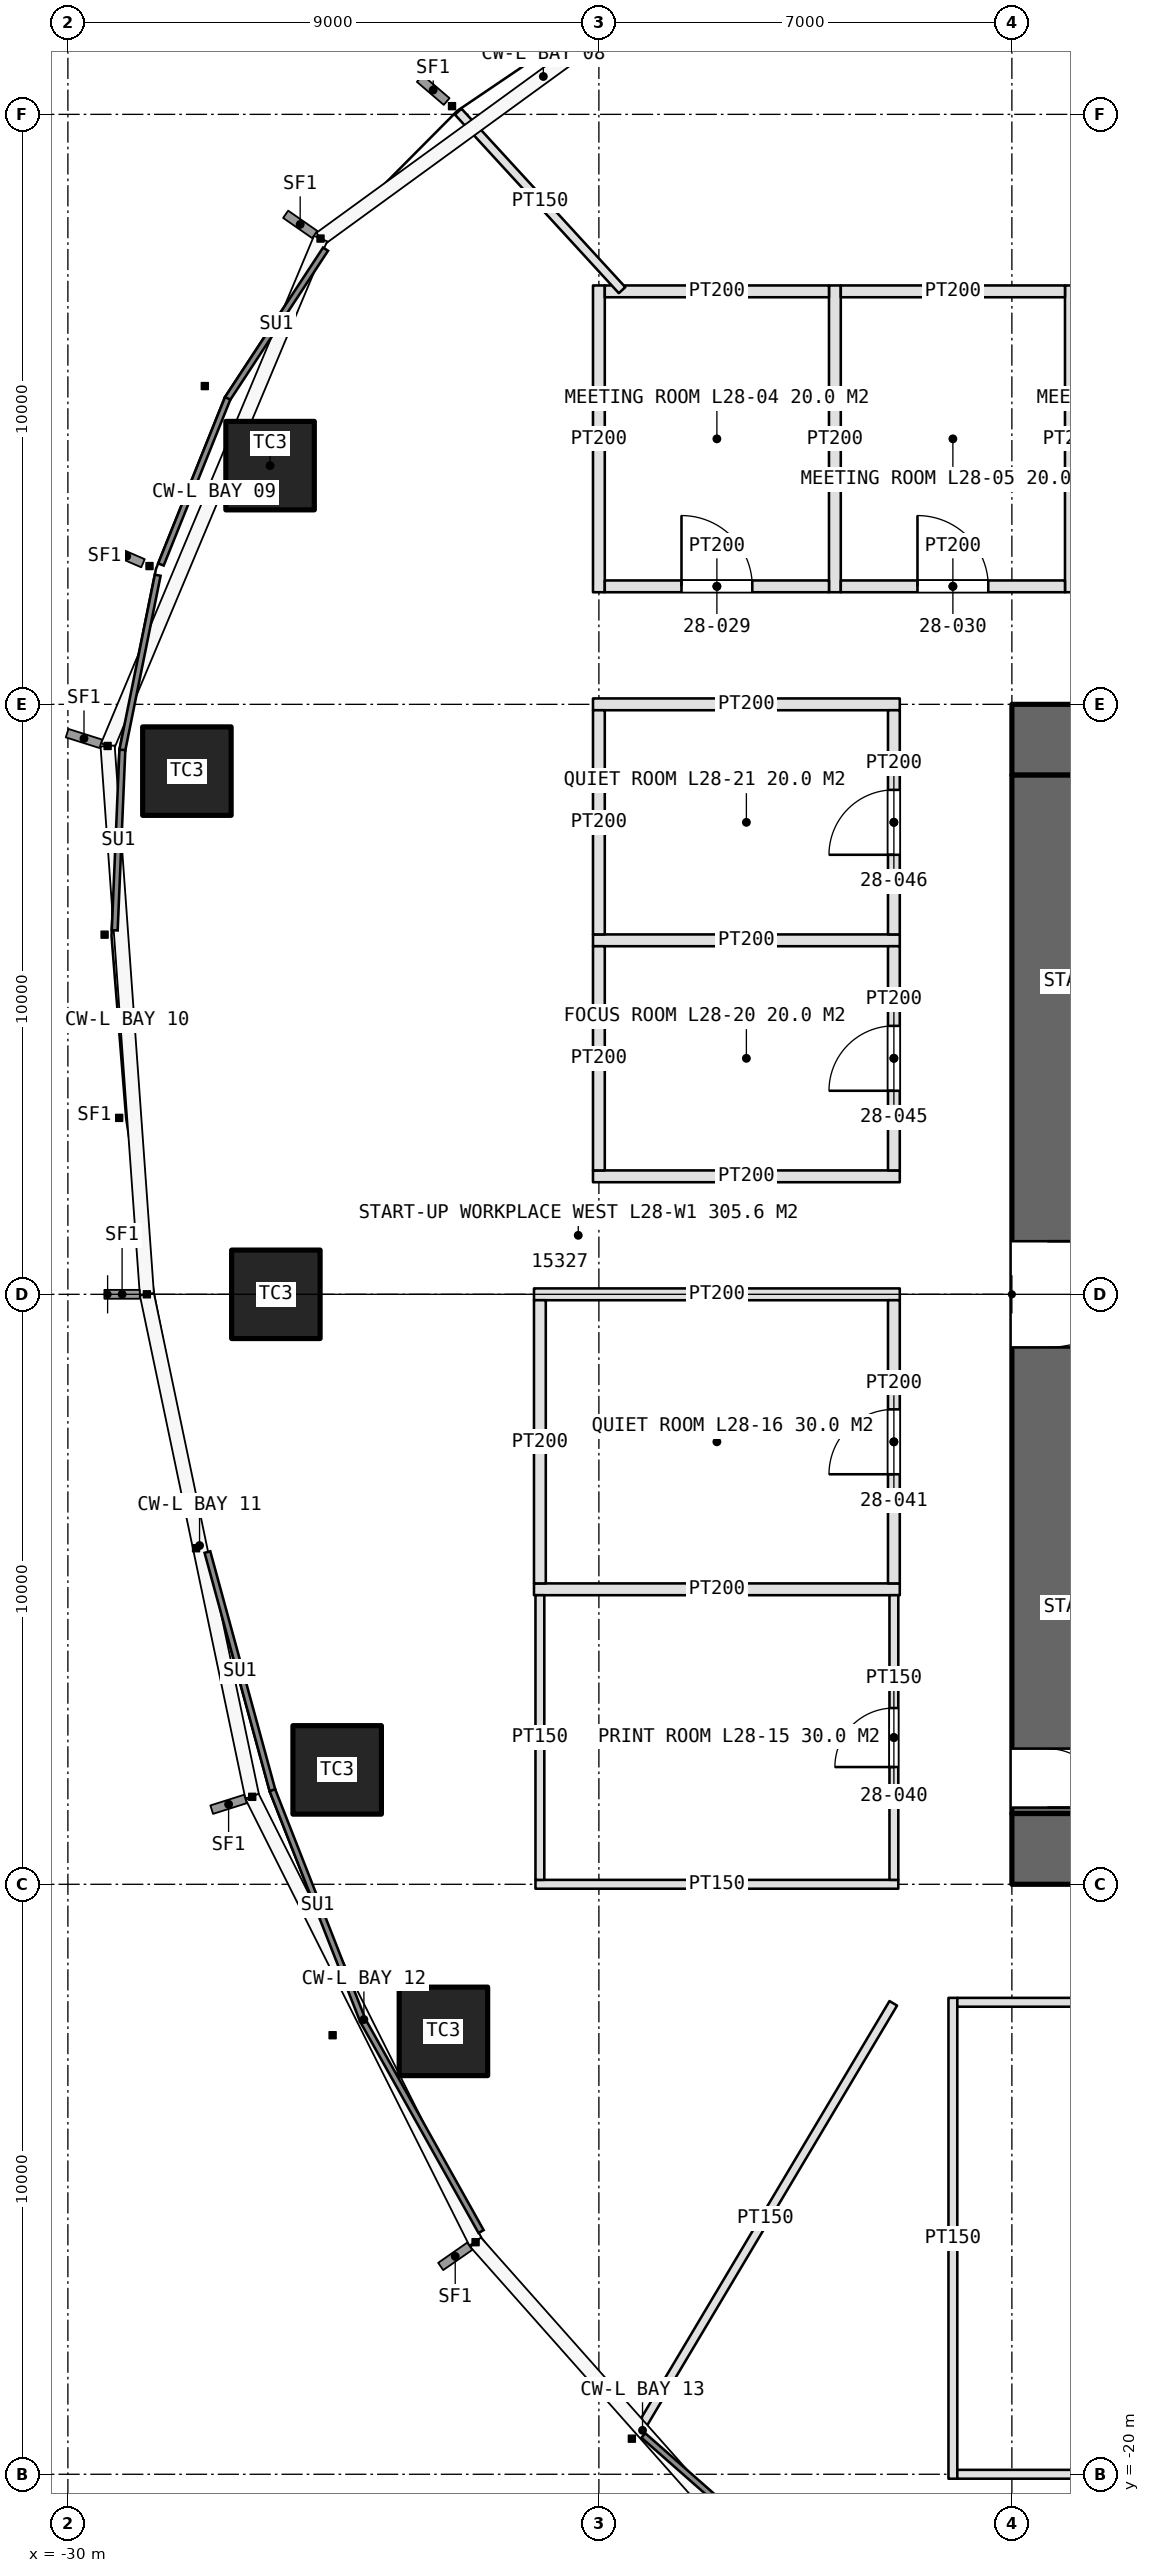
"""IFC4 building model, lengths in metres.
Left out: names, types, materials, properties, quantities, classifications, styles, units other than length and angle.
Written with IfcOpenShell. Run it as: python <this file> out.ifc"""

import sys

from ifc_helpers import new_model, si_unit, direction, frame, frame_2d, origin, origin_2d, place, context, subcontext, project, spatial, rectangle, extrude, element, fill, save


model = new_model("IFC4")
c1 = context("Model", 3, precision=1e-05, world=origin(), true_north=direction((0.0, 1.0)))
c2 = subcontext(c1, "Body", "Model", "MODEL_VIEW")
j1 = project(units=[si_unit("LENGTHUNIT", "METRE"), si_unit("PLANEANGLEUNIT", "RADIAN")], contexts=[c1])
p1 = place(None, origin())
s1 = spatial("IfcSite", under=j1, at=p1, CompositionType="ELEMENT")
p2 = place(p1, origin())
s2 = spatial("IfcBuilding", under=s1, at=p2, CompositionType="ELEMENT")
p3 = place(p2, frame((0.0, 0.0, 134.4)))
s3 = spatial("IfcBuildingStorey", under=s2, at=p3, CompositionType="ELEMENT", Elevation=134.4)
p4 = place(p3, frame((-14.0, -9.4, 0.0), z_axis=(0.0, 0.0, 1.0), x_axis=(1.0, 0.0, 0.0)))
e1 = element("IfcWall", 1, at=p4, inside=s3, PredefinedType="SHEAR", context=c2, shape_type="SweptSolid", body=[
    extrude(rectangle(XDim=28.0, YDim=1.2, at=frame_2d((14.0, 0.0))), origin(), (0.0, 0.0, 1.0), 4.2),
])
p5 = place(p4, frame((13.1, 0.0, 0.0)))
e2 = element("IfcOpeningElement", 2, at=p5, cuts=e1, PredefinedType="OPENING", context=c2, shape_type="SweptSolid", body=[
    extrude(rectangle(XDim=1.8, YDim=2.4, at=frame_2d((0.9, 1.2))), frame((0.0, 0.61, 0.0), z_axis=(0.0, -1.0, 0.0), x_axis=(1.0, 0.0, 0.0)), (0.0, 0.0, 1.0), 1.22),
])
p6 = place(p4, frame((22.9, 0.0, 0.0)))
e3 = element("IfcOpeningElement", 3, at=p6, cuts=e1, PredefinedType="OPENING", context=c2, shape_type="SweptSolid", body=[
    extrude(rectangle(XDim=2.2, YDim=2.7, at=frame_2d((1.1, 1.35))), frame((0.0, 0.61, 0.0), z_axis=(0.0, -1.0, 0.0), x_axis=(1.0, 0.0, 0.0)), (0.0, 0.0, 1.0), 1.22),
])
p7 = place(p3, frame((14.0, 9.4, 0.0), z_axis=(0.0, 0.0, 1.0), x_axis=(-1.0, 0.0, 0.0)))
e4 = element("IfcWall", 4, at=p7, inside=s3, PredefinedType="SHEAR", context=c2, shape_type="SweptSolid", body=[
    extrude(rectangle(XDim=28.0, YDim=1.2, at=frame_2d((14.0, 0.0))), origin(), (0.0, 0.0, 1.0), 4.2),
])
p8 = place(p7, frame((24.0, 0.0, 0.0)))
e5 = element("IfcOpeningElement", 5, at=p8, cuts=e4, PredefinedType="OPENING", context=c2, shape_type="SweptSolid", body=[
    extrude(rectangle(XDim=1.0, YDim=2.4, at=frame_2d((0.5, 1.2))), frame((0.0, 0.61, 0.0), z_axis=(0.0, -1.0, 0.0), x_axis=(1.0, 0.0, 0.0)), (0.0, 0.0, 1.0), 1.22),
])
p9 = place(p7, frame((13.1, 0.0, 0.0)))
e6 = element("IfcOpeningElement", 6, at=p9, cuts=e4, PredefinedType="OPENING", context=c2, shape_type="SweptSolid", body=[
    extrude(rectangle(XDim=1.8, YDim=2.4, at=frame_2d((0.9, 1.2))), frame((0.0, 0.61, 0.0), z_axis=(0.0, -1.0, 0.0), x_axis=(1.0, 0.0, 0.0)), (0.0, 0.0, 1.0), 1.22),
])
p10 = place(p3, frame((-13.4, 8.8, 0.0), z_axis=(0.0, 0.0, 1.0), x_axis=(0.0, -1.0, 0.0)))
e7 = element("IfcWall", 7, at=p10, inside=s3, PredefinedType="SHEAR", context=c2, shape_type="SweptSolid", body=[
    extrude(rectangle(XDim=17.6, YDim=1.2, at=frame_2d((8.8, 0.0))), origin(), (0.0, 0.0, 1.0), 4.2),
])
p11 = place(p10, frame((7.9, 0.0, 0.0)))
e8 = element("IfcOpeningElement", 8, at=p11, cuts=e7, PredefinedType="OPENING", context=c2, shape_type="SweptSolid", body=[
    extrude(rectangle(XDim=1.8, YDim=2.4, at=frame_2d((0.9, 1.2))), frame((0.0, 0.61, 0.0), z_axis=(0.0, -1.0, 0.0), x_axis=(1.0, 0.0, 0.0)), (0.0, 0.0, 1.0), 1.22),
])
p12 = place(p10, frame((16.5, 0.0, 0.0)))
e9 = element("IfcOpeningElement", 9, at=p12, cuts=e7, PredefinedType="OPENING", context=c2, shape_type="SweptSolid", body=[
    extrude(rectangle(XDim=1.0, YDim=2.4, at=frame_2d((0.5, 1.2))), frame((0.0, 0.61, 0.0), z_axis=(0.0, -1.0, 0.0), x_axis=(1.0, 0.0, 0.0)), (0.0, 0.0, 1.0), 1.22),
])
for number, where, z_axis, x_axis in (
    (10, (-26.573, 14.046, 0.0), (0.0, 0.0, 1.0), (1.0, 0.0, 0.0)),
    (11, (-27.983, 8.868, 0.0), (0.0, 0.0, 1.0), (1.0, 0.0, 0.0)),
    (12, (-26.475, 0.0, 0.0), (0.0, 0.0, 1.0), (1.0, 0.0, 0.0)),
    (13, (-25.436, -8.061, 0.0), (0.0, 0.0, 1.0), (1.0, 0.0, 0.0)),
    (14, (-23.635, -12.493, 0.0), (0.0, 0.0, 1.0), (1.0, 0.0, 0.0)),
):
    element("IfcColumn", number, at=place(p3, frame(where, z_axis=z_axis, x_axis=x_axis)), inside=s3, PredefinedType="COLUMN", context=c2, shape_type="SweptSolid", body=[
        extrude(rectangle(XDim=1.5, YDim=1.5, at=origin_2d()), origin(), (0.0, 0.0, 1.0), 4.2),
    ])
p13 = place(p3, frame((-15.0, -11.925, 0.0), z_axis=(0.0, 0.0, 1.0), x_axis=(0.0, -1.0, 0.0)))
e15 = element("IfcWall", 15, at=p13, inside=s3, PredefinedType="PARTITIONING", context=c2, shape_type="SweptSolid", body=[
    extrude(rectangle(XDim=8.15, YDim=0.15, at=frame_2d((4.075, 0.0))), origin(), (0.0, 0.0, 1.0), 3.0),
])
p14 = place(p3, frame((-14.925, -12.0, 0.0), z_axis=(0.0, 0.0, 1.0), x_axis=(1.0, 0.0, 0.0)))
e16 = element("IfcWall", 16, at=p14, inside=s3, PredefinedType="PARTITIONING", context=c2, shape_type="SweptSolid", body=[
    extrude(rectangle(XDim=11.85, YDim=0.15, at=frame_2d((5.925, 0.0))), origin(), (0.0, 0.0, 1.0), 3.0),
])
p15 = place(p14, frame((5.325, 0.0, 0.0)))
e17 = element("IfcOpeningElement", 17, at=p15, cuts=e16, PredefinedType="OPENING", context=c2, shape_type="SweptSolid", body=[
    extrude(rectangle(XDim=1.2, YDim=2.4, at=frame_2d((0.6, 1.2))), frame((0.0, 0.085, 0.0), z_axis=(0.0, -1.0, 0.0), x_axis=(1.0, 0.0, 0.0)), (0.0, 0.0, 1.0), 0.17),
])
p16 = place(p3, frame((-14.925, -20.0, 0.0), z_axis=(0.0, 0.0, 1.0), x_axis=(1.0, 0.0, 0.0)))
e18 = element("IfcWall", 18, at=p16, inside=s3, PredefinedType="PARTITIONING", context=c2, shape_type="SweptSolid", body=[
    extrude(rectangle(XDim=11.85, YDim=0.15, at=frame_2d((5.925, 0.0))), origin(), (0.0, 0.0, 1.0), 3.0),
])
for number, where, z_axis, x_axis in (
    (19, (-21.0, 11.9, 0.0), (0.0, 0.0, 1.0), (0.0, 1.0, 0.0)),
    (20, (-17.0, 11.9, 0.0), (0.0, 0.0, 1.0), (0.0, 1.0, 0.0)),
    (21, (-13.0, 11.9, 0.0), (0.0, 0.0, 1.0), (0.0, 1.0, 0.0)),
):
    element("IfcWall", number, at=place(p3, frame(where, z_axis=z_axis, x_axis=x_axis)), inside=s3, PredefinedType="PARTITIONING", context=c2, shape_type="SweptSolid", body=[
        extrude(rectangle(XDim=5.2, YDim=0.2, at=frame_2d((2.6, 0.0))), origin(), (0.0, 0.0, 1.0), 3.0),
    ])
p17 = place(p3, frame((-20.9, 12.0, 0.0), z_axis=(0.0, 0.0, 1.0), x_axis=(1.0, 0.0, 0.0)))
e22 = element("IfcWall", 22, at=p17, inside=s3, PredefinedType="PARTITIONING", context=c2, shape_type="SweptSolid", body=[
    extrude(rectangle(XDim=3.8, YDim=0.2, at=frame_2d((1.9, 0.0))), origin(), (0.0, 0.0, 1.0), 3.0),
])
p18 = place(p17, frame((1.3, 0.0, 0.0)))
e23 = element("IfcOpeningElement", 23, at=p18, cuts=e22, PredefinedType="OPENING", context=c2, shape_type="SweptSolid", body=[
    extrude(rectangle(XDim=1.2, YDim=2.4, at=frame_2d((0.6, 1.2))), frame((0.0, 0.11, 0.0), z_axis=(0.0, -1.0, 0.0), x_axis=(1.0, 0.0, 0.0)), (0.0, 0.0, 1.0), 0.22),
])
p19 = place(p3, frame((-20.9, 17.0, 0.0), z_axis=(0.0, 0.0, 1.0), x_axis=(1.0, 0.0, 0.0)))
e24 = element("IfcWall", 24, at=p19, inside=s3, PredefinedType="PARTITIONING", context=c2, shape_type="SweptSolid", body=[
    extrude(rectangle(XDim=3.8, YDim=0.2, at=frame_2d((1.9, 0.0))), origin(), (0.0, 0.0, 1.0), 3.0),
])
p20 = place(p3, frame((-16.9, 12.0, 0.0), z_axis=(0.0, 0.0, 1.0), x_axis=(1.0, 0.0, 0.0)))
e25 = element("IfcWall", 25, at=p20, inside=s3, PredefinedType="PARTITIONING", context=c2, shape_type="SweptSolid", body=[
    extrude(rectangle(XDim=3.8, YDim=0.2, at=frame_2d((1.9, 0.0))), origin(), (0.0, 0.0, 1.0), 3.0),
])
p21 = place(p20, frame((1.3, 0.0, 0.0)))
e26 = element("IfcOpeningElement", 26, at=p21, cuts=e25, PredefinedType="OPENING", context=c2, shape_type="SweptSolid", body=[
    extrude(rectangle(XDim=1.2, YDim=2.4, at=frame_2d((0.6, 1.2))), frame((0.0, 0.11, 0.0), z_axis=(0.0, -1.0, 0.0), x_axis=(1.0, 0.0, 0.0)), (0.0, 0.0, 1.0), 0.22),
])
p22 = place(p3, frame((-16.9, 17.0, 0.0), z_axis=(0.0, 0.0, 1.0), x_axis=(1.0, 0.0, 0.0)))
e27 = element("IfcWall", 27, at=p22, inside=s3, PredefinedType="PARTITIONING", context=c2, shape_type="SweptSolid", body=[
    extrude(rectangle(XDim=3.8, YDim=0.2, at=frame_2d((1.9, 0.0))), origin(), (0.0, 0.0, 1.0), 3.0),
])
p23 = place(p3, frame((-15.925, -10.0, 0.0), z_axis=(0.0, 0.0, 1.0), x_axis=(-1.0, 0.0, 0.0)))
e28 = element("IfcWall", 28, at=p23, inside=s3, PredefinedType="PARTITIONING", context=c2, shape_type="SweptSolid", body=[
    extrude(rectangle(XDim=6.15, YDim=0.15, at=frame_2d((3.075, 0.0))), origin(), (0.0, 0.0, 1.0), 3.0),
])
for number, where, z_axis, x_axis in (
    (29, (-15.9, -5.0, 0.0), (0.0, 0.0, 1.0), (-1.0, 0.0, 0.0)),
    (30, (-15.9, 0.0, 0.0), (0.0, 0.0, 1.0), (-1.0, 0.0, 0.0)),
):
    element("IfcWall", number, at=place(p3, frame(where, z_axis=z_axis, x_axis=x_axis)), inside=s3, PredefinedType="PARTITIONING", context=c2, shape_type="SweptSolid", body=[
        extrude(rectangle(XDim=6.2, YDim=0.2, at=frame_2d((3.1, 0.0))), origin(), (0.0, 0.0, 1.0), 3.0),
    ])
p24 = place(p3, frame((-16.0, -9.925, 0.0), z_axis=(0.0, 0.0, 1.0), x_axis=(0.0, 1.0, 0.0)))
e31 = element("IfcWall", 31, at=p24, inside=s3, PredefinedType="PARTITIONING", context=c2, shape_type="SweptSolid", body=[
    extrude(rectangle(XDim=4.825, YDim=0.15, at=frame_2d((2.413, 0.0))), origin(), (0.0, 0.0, 1.0), 3.0),
])
p25 = place(p24, frame((1.913, 0.0, 0.0)))
e32 = element("IfcOpeningElement", 32, at=p25, cuts=e31, PredefinedType="OPENING", context=c2, shape_type="SweptSolid", body=[
    extrude(rectangle(XDim=1.0, YDim=2.2, at=frame_2d((0.5, 1.1))), frame((0.0, 0.085, 0.0), z_axis=(0.0, -1.0, 0.0), x_axis=(1.0, 0.0, 0.0)), (0.0, 0.0, 1.0), 0.17),
])
p26 = place(p3, frame((-22.0, -9.925, 0.0), z_axis=(0.0, 0.0, 1.0), x_axis=(0.0, 1.0, 0.0)))
e33 = element("IfcWall", 33, at=p26, inside=s3, PredefinedType="PARTITIONING", context=c2, shape_type="SweptSolid", body=[
    extrude(rectangle(XDim=4.825, YDim=0.15, at=frame_2d((2.413, 0.0))), origin(), (0.0, 0.0, 1.0), 3.0),
])
p27 = place(p3, frame((-16.0, -4.9, 0.0), z_axis=(0.0, 0.0, 1.0), x_axis=(0.0, 1.0, 0.0)))
e34 = element("IfcWall", 34, at=p27, inside=s3, PredefinedType="PARTITIONING", context=c2, shape_type="SweptSolid", body=[
    extrude(rectangle(XDim=4.8, YDim=0.2, at=frame_2d((2.4, 0.0))), origin(), (0.0, 0.0, 1.0), 3.0),
])
p28 = place(p27, frame((1.85, 0.0, 0.0)))
e35 = element("IfcOpeningElement", 35, at=p28, cuts=e34, PredefinedType="OPENING", context=c2, shape_type="SweptSolid", body=[
    extrude(rectangle(XDim=1.1, YDim=2.3, at=frame_2d((0.55, 1.15))), frame((0.0, 0.11, 0.0), z_axis=(0.0, -1.0, 0.0), x_axis=(1.0, 0.0, 0.0)), (0.0, 0.0, 1.0), 0.22),
])
p29 = place(p3, frame((-22.0, -4.9, 0.0), z_axis=(0.0, 0.0, 1.0), x_axis=(0.0, 1.0, 0.0)))
e36 = element("IfcWall", 36, at=p29, inside=s3, PredefinedType="PARTITIONING", context=c2, shape_type="SweptSolid", body=[
    extrude(rectangle(XDim=4.8, YDim=0.2, at=frame_2d((2.4, 0.0))), origin(), (0.0, 0.0, 1.0), 3.0),
])
for number, where, z_axis, x_axis in (
    (37, (-15.9, 2.0, 0.0), (0.0, 0.0, 1.0), (-1.0, 0.0, 0.0)),
    (38, (-15.9, 6.0, 0.0), (0.0, 0.0, 1.0), (-1.0, 0.0, 0.0)),
    (39, (-15.9, 10.0, 0.0), (0.0, 0.0, 1.0), (-1.0, 0.0, 0.0)),
):
    element("IfcWall", number, at=place(p3, frame(where, z_axis=z_axis, x_axis=x_axis)), inside=s3, PredefinedType="PARTITIONING", context=c2, shape_type="SweptSolid", body=[
        extrude(rectangle(XDim=5.2, YDim=0.2, at=frame_2d((2.6, 0.0))), origin(), (0.0, 0.0, 1.0), 3.0),
    ])
p30 = place(p3, frame((-16.0, 2.1, 0.0), z_axis=(0.0, 0.0, 1.0), x_axis=(0.0, 1.0, 0.0)))
e40 = element("IfcWall", 40, at=p30, inside=s3, PredefinedType="PARTITIONING", context=c2, shape_type="SweptSolid", body=[
    extrude(rectangle(XDim=3.8, YDim=0.2, at=frame_2d((1.9, 0.0))), origin(), (0.0, 0.0, 1.0), 3.0),
])
p31 = place(p30, frame((1.35, 0.0, 0.0)))
e41 = element("IfcOpeningElement", 41, at=p31, cuts=e40, PredefinedType="OPENING", context=c2, shape_type="SweptSolid", body=[
    extrude(rectangle(XDim=1.1, YDim=2.3, at=frame_2d((0.55, 1.15))), frame((0.0, 0.11, 0.0), z_axis=(0.0, -1.0, 0.0), x_axis=(1.0, 0.0, 0.0)), (0.0, 0.0, 1.0), 0.22),
])
p32 = place(p3, frame((-21.0, 2.1, 0.0), z_axis=(0.0, 0.0, 1.0), x_axis=(0.0, 1.0, 0.0)))
e42 = element("IfcWall", 42, at=p32, inside=s3, PredefinedType="PARTITIONING", context=c2, shape_type="SweptSolid", body=[
    extrude(rectangle(XDim=3.8, YDim=0.2, at=frame_2d((1.9, 0.0))), origin(), (0.0, 0.0, 1.0), 3.0),
])
p33 = place(p3, frame((-16.0, 6.1, 0.0), z_axis=(0.0, 0.0, 1.0), x_axis=(0.0, 1.0, 0.0)))
e43 = element("IfcWall", 43, at=p33, inside=s3, PredefinedType="PARTITIONING", context=c2, shape_type="SweptSolid", body=[
    extrude(rectangle(XDim=3.8, YDim=0.2, at=frame_2d((1.9, 0.0))), origin(), (0.0, 0.0, 1.0), 3.0),
])
p34 = place(p33, frame((1.35, 0.0, 0.0)))
e44 = element("IfcOpeningElement", 44, at=p34, cuts=e43, PredefinedType="OPENING", context=c2, shape_type="SweptSolid", body=[
    extrude(rectangle(XDim=1.1, YDim=2.3, at=frame_2d((0.55, 1.15))), frame((0.0, 0.11, 0.0), z_axis=(0.0, -1.0, 0.0), x_axis=(1.0, 0.0, 0.0)), (0.0, 0.0, 1.0), 0.22),
])
p35 = place(p3, frame((-21.0, 6.1, 0.0), z_axis=(0.0, 0.0, 1.0), x_axis=(0.0, 1.0, 0.0)))
e45 = element("IfcWall", 45, at=p35, inside=s3, PredefinedType="PARTITIONING", context=c2, shape_type="SweptSolid", body=[
    extrude(rectangle(XDim=3.8, YDim=0.2, at=frame_2d((1.9, 0.0))), origin(), (0.0, 0.0, 1.0), 3.0),
])
p36 = place(p3, frame((-16.01, -12.017, 0.0), z_axis=(0.0, 0.0, 1.0), x_axis=(-0.511508688443, -0.85927810495, 0.0)))
e46 = element("IfcWall", 46, at=p36, inside=s3, PredefinedType="PARTITIONING", context=c2, shape_type="SweptSolid", body=[
    extrude(rectangle(XDim=8.47, YDim=0.15, at=frame_2d((4.235, 0.0))), origin(), (0.0, 0.0, 1.0), 3.0),
])
p37 = place(p3, frame((-20.607, 17.02, 0.0), z_axis=(0.0, 0.0, 1.0), x_axis=(-0.676173993609, 0.736741970005, 0.0)))
e47 = element("IfcWall", 47, at=p37, inside=s3, PredefinedType="PARTITIONING", context=c2, shape_type="SweptSolid", body=[
    extrude(rectangle(XDim=4.107, YDim=0.15, at=frame_2d((2.054, 0.0))), origin(), (0.0, 0.0, 1.0), 3.0),
])
p38 = place(p11, origin())
e48 = element("IfcDoor", 48, at=p38, inside=s3, OperationType="DOUBLE_DOOR_SINGLE_SWING", PredefinedType="DOOR", context=c2, shape_type="SweptSolid", body=[
    extrude(rectangle(XDim=1.8, YDim=2.4, at=frame_2d((0.9, 1.2))), frame((0.0, 0.025, 0.0), z_axis=(0.0, -1.0, 0.0), x_axis=(1.0, 0.0, 0.0)), (0.0, 0.0, 1.0), 0.05),
])
fill(e8, e48)
p39 = place(p12, origin())
e49 = element("IfcDoor", 49, at=p39, inside=s3, OperationType="SINGLE_SWING_RIGHT", PredefinedType="DOOR", context=c2, shape_type="SweptSolid", body=[
    extrude(rectangle(XDim=1.0, YDim=2.4, at=frame_2d((0.5, 1.2))), frame((0.0, 0.025, 0.0), z_axis=(0.0, -1.0, 0.0), x_axis=(1.0, 0.0, 0.0)), (0.0, 0.0, 1.0), 0.05),
])
fill(e9, e49)
p40 = place(p18, origin())
e50 = element("IfcDoor", 50, at=p40, inside=s3, OperationType="SINGLE_SWING_LEFT", PredefinedType="DOOR", context=c2, shape_type="SweptSolid", body=[
    extrude(rectangle(XDim=1.2, YDim=2.4, at=frame_2d((0.6, 1.2))), frame((0.0, 0.025, 0.0), z_axis=(0.0, -1.0, 0.0), x_axis=(1.0, 0.0, 0.0)), (0.0, 0.0, 1.0), 0.05),
])
fill(e23, e50)
p41 = place(p21, origin())
e51 = element("IfcDoor", 51, at=p41, inside=s3, OperationType="SINGLE_SWING_LEFT", PredefinedType="DOOR", context=c2, shape_type="SweptSolid", body=[
    extrude(rectangle(XDim=1.2, YDim=2.4, at=frame_2d((0.6, 1.2))), frame((0.0, 0.025, 0.0), z_axis=(0.0, -1.0, 0.0), x_axis=(1.0, 0.0, 0.0)), (0.0, 0.0, 1.0), 0.05),
])
fill(e26, e51)
p42 = place(p25, origin())
e52 = element("IfcDoor", 52, at=p42, inside=s3, OperationType="SINGLE_SWING_LEFT", PredefinedType="DOOR", context=c2, shape_type="SweptSolid", body=[
    extrude(rectangle(XDim=1.0, YDim=2.2, at=frame_2d((0.5, 1.1))), frame((0.0, 0.025, 0.0), z_axis=(0.0, -1.0, 0.0), x_axis=(1.0, 0.0, 0.0)), (0.0, 0.0, 1.0), 0.05),
])
fill(e32, e52)
p43 = place(p28, origin())
e53 = element("IfcDoor", 53, at=p43, inside=s3, OperationType="SINGLE_SWING_LEFT", PredefinedType="DOOR", context=c2, shape_type="SweptSolid", body=[
    extrude(rectangle(XDim=1.1, YDim=2.3, at=frame_2d((0.55, 1.15))), frame((0.0, 0.025, 0.0), z_axis=(0.0, -1.0, 0.0), x_axis=(1.0, 0.0, 0.0)), (0.0, 0.0, 1.0), 0.05),
])
fill(e35, e53)
p44 = place(p31, origin())
e54 = element("IfcDoor", 54, at=p44, inside=s3, OperationType="SINGLE_SWING_LEFT", PredefinedType="DOOR", context=c2, shape_type="SweptSolid", body=[
    extrude(rectangle(XDim=1.1, YDim=2.3, at=frame_2d((0.55, 1.15))), frame((0.0, 0.025, 0.0), z_axis=(0.0, -1.0, 0.0), x_axis=(1.0, 0.0, 0.0)), (0.0, 0.0, 1.0), 0.05),
])
fill(e41, e54)
p45 = place(p34, origin())
e55 = element("IfcDoor", 55, at=p45, inside=s3, OperationType="SINGLE_SWING_LEFT", PredefinedType="DOOR", context=c2, shape_type="SweptSolid", body=[
    extrude(rectangle(XDim=1.1, YDim=2.3, at=frame_2d((0.55, 1.15))), frame((0.0, 0.025, 0.0), z_axis=(0.0, -1.0, 0.0), x_axis=(1.0, 0.0, 0.0)), (0.0, 0.0, 1.0), 0.05),
])
fill(e44, e55)
save(model, sys.argv[1])
